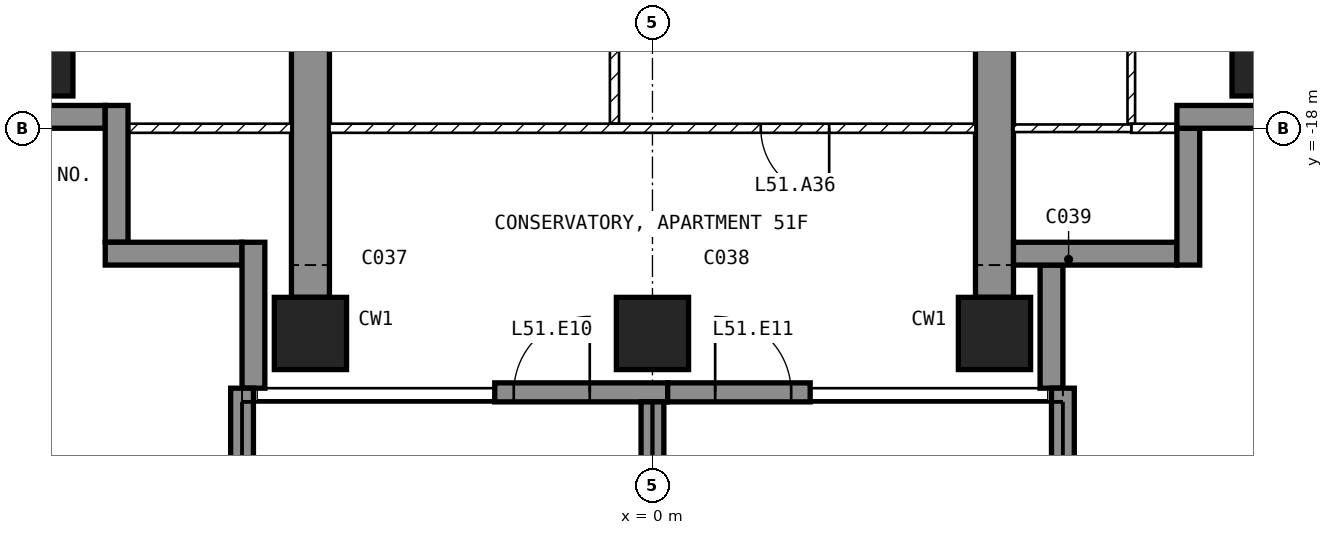
"""IFC4 building model, lengths in metres.
Left out: names, types, materials, properties, quantities, classifications, styles, units other than length and angle.
Written with IfcOpenShell. Run it as: python <this file> out.ifc"""

import sys

from ifc_helpers import new_model, si_unit, direction, frame, frame_2d, origin, origin_2d, place, context, subcontext, project, spatial, polyline, rectangle, outline, extrude, element, fill, save


model = new_model("IFC4")
c1 = context("Model", 3, precision=1e-05, world=origin(), true_north=direction((0.0, 1.0)))
c2 = subcontext(c1, "Body", "Model", "MODEL_VIEW")
j1 = project(units=[si_unit("LENGTHUNIT", "METRE"), si_unit("PLANEANGLEUNIT", "RADIAN")], contexts=[c1])
p1 = place(None, origin())
s1 = spatial("IfcSite", under=j1, at=p1, CompositionType="ELEMENT")
p2 = place(p1, origin())
s2 = spatial("IfcBuilding", under=s1, at=p2, CompositionType="ELEMENT")
p3 = place(p2, frame((0.0, 0.0, 205.1)))
s3 = spatial("IfcBuildingStorey", under=s2, at=p3, CompositionType="ELEMENT", Elevation=205.1)
for number, where, z_axis, x_axis in (
    (1, (-8.1, -17.1, -0.25), (0.0, 0.0, 1.0), (1.0, 0.0, 0.0)),
    (2, (-4.5, -20.7, -0.25), (0.0, 0.0, 1.0), (1.0, 0.0, 0.0)),
    (3, (0.0, -20.7, -0.25), (0.0, 0.0, 1.0), (1.0, 0.0, 0.0)),
    (4, (4.5, -20.7, -0.25), (0.0, 0.0, 1.0), (1.0, 0.0, 0.0)),
    (5, (8.1, -17.1, -0.25), (0.0, 0.0, 1.0), (1.0, 0.0, 0.0)),
):
    element("IfcColumn", number, at=place(p3, frame(where, z_axis=z_axis, x_axis=x_axis)), inside=s3, PredefinedType="COLUMN", context=c2, shape_type="SweptSolid", body=[
        extrude(rectangle(XDim=0.95, YDim=0.95, at=origin_2d()), origin(), (0.0, 0.0, 1.0), 3.5),
    ])
for number, where, z_axis, x_axis in (
    (6, (-4.75, -20.225, -0.25), (1.0, 0.0, 0.0), (0.0, 1.0, 0.0)),
    (7, (4.25, -20.225, -0.25), (1.0, 0.0, 0.0), (0.0, 1.0, 0.0)),
):
    element("IfcWall", number, at=place(p3, frame(where, z_axis=z_axis, x_axis=x_axis)), inside=s3, PredefinedType="SHEAR", context=c2, shape_type="SweptSolid", body=[
        extrude(outline(polyline([(0.0, 0.0), (6.725, 0.0), (6.725, 2.65), (9.125, 2.65), (9.125, 0.0), (11.225, 0.0), (11.225, 3.5), (0.0, 3.5), (0.0, 0.0)])), origin(), (0.0, 0.0, 1.0), 0.5),
    ])
p4 = place(p3, frame((-2.075, -21.475, 0.0), z_axis=(0.0, 0.0, 1.0), x_axis=(1.0, 0.0, 0.0)))
e8 = element("IfcWall", 8, at=p4, inside=s3, PredefinedType="SOLIDWALL", context=c2, shape_type="SweptSolid", body=[
    extrude(rectangle(XDim=2.275, YDim=0.25, at=frame_2d((1.137, 0.0))), origin(), (0.0, 0.0, 1.0), 3.25),
])
p5 = place(p4, frame((0.25, 0.0, 0.0)))
e9 = element("IfcOpeningElement", 9, at=p5, cuts=e8, PredefinedType="OPENING", context=c2, shape_type="SweptSolid", body=[
    extrude(rectangle(XDim=1.0, YDim=2.4, at=frame_2d((0.5, 1.2))), frame((0.0, 0.135, 0.0), z_axis=(0.0, -1.0, 0.0), x_axis=(1.0, 0.0, 0.0)), (0.0, 0.0, 1.0), 0.27),
])
p6 = place(p3, frame((0.2, -21.475, 0.0), z_axis=(0.0, 0.0, 1.0), x_axis=(1.0, 0.0, 0.0)))
e10 = element("IfcWall", 10, at=p6, inside=s3, PredefinedType="SOLIDWALL", context=c2, shape_type="SweptSolid", body=[
    extrude(rectangle(XDim=1.875, YDim=0.25, at=frame_2d((0.938, 0.0))), origin(), (0.0, 0.0, 1.0), 3.25),
])
p7 = place(p6, frame((0.625, 0.0, 0.0)))
e11 = element("IfcOpeningElement", 11, at=p7, cuts=e10, PredefinedType="OPENING", context=c2, shape_type="SweptSolid", body=[
    extrude(rectangle(XDim=1.0, YDim=2.4, at=frame_2d((0.5, 1.2))), frame((0.0, 0.135, 0.0), z_axis=(0.0, -1.0, 0.0), x_axis=(1.0, 0.0, 0.0)), (0.0, 0.0, 1.0), 0.27),
])
p8 = place(p3, frame((5.25, -21.42, 0.0), z_axis=(0.0, 0.0, 1.0), x_axis=(0.0, 1.0, 0.0)))
e12 = element("IfcWall", 12, at=p8, inside=s3, PredefinedType="SOLIDWALL", context=c2, shape_type="SweptSolid", body=[
    extrude(rectangle(XDim=1.62, YDim=0.3, at=frame_2d((0.81, 0.0))), origin(), (0.0, 0.0, 1.0), 3.25),
])
p9 = place(p3, frame((4.75, -19.65, 0.0), z_axis=(0.0, 0.0, 1.0), x_axis=(1.0, 0.0, 0.0)))
e13 = element("IfcWall", 13, at=p9, inside=s3, PredefinedType="SOLIDWALL", context=c2, shape_type="SweptSolid", body=[
    extrude(rectangle(XDim=2.15, YDim=0.3, at=frame_2d((1.075, 0.0))), origin(), (0.0, 0.0, 1.0), 3.25),
])
p10 = place(p3, frame((7.05, -19.8, 0.0), z_axis=(0.0, 0.0, 1.0), x_axis=(0.0, 1.0, 0.0)))
e14 = element("IfcWall", 14, at=p10, inside=s3, PredefinedType="SOLIDWALL", context=c2, shape_type="SweptSolid", body=[
    extrude(rectangle(XDim=1.8, YDim=0.3, at=frame_2d((0.9, 0.0))), origin(), (0.0, 0.0, 1.0), 3.25),
])
p11 = place(p3, frame((6.9, -17.85, 0.0), z_axis=(0.0, 0.0, 1.0), x_axis=(1.0, 0.0, 0.0)))
e15 = element("IfcWall", 15, at=p11, inside=s3, PredefinedType="SOLIDWALL", context=c2, shape_type="SweptSolid", body=[
    extrude(rectangle(XDim=1.85, YDim=0.3, at=frame_2d((0.925, 0.0))), origin(), (0.0, 0.0, 1.0), 3.25),
])
p12 = place(p3, frame((-8.75, -17.85, 0.0), z_axis=(0.0, 0.0, 1.0), x_axis=(1.0, 0.0, 0.0)))
e16 = element("IfcWall", 16, at=p12, inside=s3, PredefinedType="SOLIDWALL", context=c2, shape_type="SweptSolid", body=[
    extrude(rectangle(XDim=1.55, YDim=0.3, at=frame_2d((0.775, 0.0))), origin(), (0.0, 0.0, 1.0), 3.25),
])
for number, where, z_axis, x_axis in (
    (17, (-7.05, -17.7, 0.0), (0.0, 0.0, 1.0), (0.0, -1.0, 0.0)),
    (18, (-7.2, -19.65, 0.0), (0.0, 0.0, 1.0), (1.0, 0.0, 0.0)),
):
    element("IfcWall", number, at=place(p3, frame(where, z_axis=z_axis, x_axis=x_axis)), inside=s3, PredefinedType="SOLIDWALL", context=c2, shape_type="SweptSolid", body=[
        extrude(rectangle(XDim=1.8, YDim=0.3, at=frame_2d((0.9, 0.0))), origin(), (0.0, 0.0, 1.0), 3.25),
    ])
p13 = place(p3, frame((-5.25, -19.5, 0.0), z_axis=(0.0, 0.0, 1.0), x_axis=(0.0, -1.0, 0.0)))
e19 = element("IfcWall", 19, at=p13, inside=s3, PredefinedType="SOLIDWALL", context=c2, shape_type="SweptSolid", body=[
    extrude(rectangle(XDim=1.92, YDim=0.3, at=frame_2d((0.96, 0.0))), origin(), (0.0, 0.0, 1.0), 3.25),
])
p14 = place(p3, frame((-5.4, -21.42, 0.0), z_axis=(0.0, 0.0, 1.0), x_axis=(0.0, -1.0, 0.0)))
e20 = element("IfcWall", 20, at=p14, inside=s3, PredefinedType="SOLIDWALL", context=c2, shape_type="SweptSolid", body=[
    extrude(rectangle(XDim=2.88, YDim=0.3, at=frame_2d((1.44, 0.0))), origin(), (0.0, 0.0, 1.0), 3.25),
])
p15 = place(p3, frame((0.0, -21.6, 0.0), z_axis=(0.0, 0.0, 1.0), x_axis=(0.0, -1.0, 0.0)))
e21 = element("IfcWall", 21, at=p15, inside=s3, PredefinedType="SOLIDWALL", context=c2, shape_type="SweptSolid", body=[
    extrude(rectangle(XDim=2.7, YDim=0.3, at=frame_2d((1.35, 0.0))), origin(), (0.0, 0.0, 1.0), 3.25),
])
p16 = place(p3, frame((5.4, -21.42, 0.0), z_axis=(0.0, 0.0, 1.0), x_axis=(0.0, -1.0, 0.0)))
e22 = element("IfcWall", 22, at=p16, inside=s3, PredefinedType="SOLIDWALL", context=c2, shape_type="SweptSolid", body=[
    extrude(rectangle(XDim=2.88, YDim=0.3, at=frame_2d((1.44, 0.0))), origin(), (0.0, 0.0, 1.0), 3.25),
])
p17 = place(p3, frame((-0.5, -17.94, 0.0), z_axis=(0.0, 0.0, 1.0), x_axis=(0.0, 1.0, 0.0)))
e23 = element("IfcWall", 23, at=p17, inside=s3, PredefinedType="PARTITIONING", context=c2, shape_type="SweptSolid", body=[
    extrude(rectangle(XDim=2.88, YDim=0.12, at=frame_2d((1.44, 0.0))), origin(), (0.0, 0.0, 1.0), 3.25),
])
p18 = place(p17, frame((0.99, 0.0, 0.0)))
e24 = element("IfcOpeningElement", 24, at=p18, cuts=e23, PredefinedType="OPENING", context=c2, shape_type="SweptSolid", body=[
    extrude(rectangle(XDim=0.9, YDim=2.1, at=frame_2d((0.45, 1.05))), frame((0.0, 0.07, 0.0), z_axis=(0.0, -1.0, 0.0), x_axis=(1.0, 0.0, 0.0)), (0.0, 0.0, 1.0), 0.14),
])
p19 = place(p3, frame((4.25, -18.0, 0.0), z_axis=(0.0, 0.0, 1.0), x_axis=(-1.0, 0.0, 0.0)))
e25 = element("IfcWall", 25, at=p19, inside=s3, PredefinedType="PARTITIONING", context=c2, shape_type="SweptSolid", body=[
    extrude(rectangle(XDim=8.5, YDim=0.12, at=frame_2d((4.25, 0.0))), origin(), (0.0, 0.0, 1.0), 3.25),
])
p20 = place(p19, frame((1.925, 0.0, 0.0)))
e26 = element("IfcOpeningElement", 26, at=p20, cuts=e25, PredefinedType="OPENING", context=c2, shape_type="SweptSolid", body=[
    extrude(rectangle(XDim=0.9, YDim=2.1, at=frame_2d((0.45, 1.05))), frame((0.0, 0.07, 0.0), z_axis=(0.0, -1.0, 0.0), x_axis=(1.0, 0.0, 0.0)), (0.0, 0.0, 1.0), 0.14),
])
p21 = place(p3, frame((6.3, -17.94, 0.0), z_axis=(0.0, 0.0, 1.0), x_axis=(0.0, 1.0, 0.0)))
e27 = element("IfcWall", 27, at=p21, inside=s3, PredefinedType="PARTITIONING", context=c2, shape_type="SweptSolid", body=[
    extrude(rectangle(XDim=3.49, YDim=0.1, at=frame_2d((1.745, 0.0))), origin(), (0.0, 0.0, 1.0), 3.25),
])
p22 = place(p21, frame((1.32, 0.0, 0.0)))
e28 = element("IfcOpeningElement", 28, at=p22, cuts=e27, PredefinedType="OPENING", context=c2, shape_type="SweptSolid", body=[
    extrude(rectangle(XDim=0.85, YDim=2.1, at=frame_2d((0.425, 1.05))), frame((0.0, 0.06, 0.0), z_axis=(0.0, -1.0, 0.0), x_axis=(1.0, 0.0, 0.0)), (0.0, 0.0, 1.0), 0.12),
])
p23 = place(p3, frame((7.12, -18.0, 0.0), z_axis=(0.0, 0.0, 1.0), x_axis=(-1.0, 0.0, 0.0)))
e29 = element("IfcWall", 29, at=p23, inside=s3, PredefinedType="PARTITIONING", context=c2, shape_type="SweptSolid", body=[
    extrude(rectangle(XDim=0.82, YDim=0.12, at=frame_2d((0.41, 0.0))), origin(), (0.0, 0.0, 1.0), 3.25),
])
p24 = place(p3, frame((6.3, -18.0, 0.0), z_axis=(0.0, 0.0, 1.0), x_axis=(-1.0, 0.0, 0.0)))
e30 = element("IfcWall", 30, at=p24, inside=s3, PredefinedType="PARTITIONING", context=c2, shape_type="SweptSolid", body=[
    extrude(rectangle(XDim=1.55, YDim=0.1, at=frame_2d((0.775, 0.0))), origin(), (0.0, 0.0, 1.0), 3.25),
])
p25 = place(p3, frame((-4.75, -18.0, 0.0), z_axis=(0.0, 0.0, 1.0), x_axis=(-1.0, 0.0, 0.0)))
e31 = element("IfcWall", 31, at=p25, inside=s3, PredefinedType="PARTITIONING", context=c2, shape_type="SweptSolid", body=[
    extrude(rectangle(XDim=2.37, YDim=0.12, at=frame_2d((1.185, 0.0))), origin(), (0.0, 0.0, 1.0), 3.25),
])
p26 = place(p5, origin())
e32 = element("IfcDoor", 32, at=p26, inside=s3, OperationType="SINGLE_SWING_RIGHT", PredefinedType="DOOR", context=c2, shape_type="SweptSolid", body=[
    extrude(rectangle(XDim=1.0, YDim=2.4, at=frame_2d((0.5, 1.2))), frame((0.0, 0.025, 0.0), z_axis=(0.0, -1.0, 0.0), x_axis=(1.0, 0.0, 0.0)), (0.0, 0.0, 1.0), 0.05),
])
fill(e9, e32)
p27 = place(p7, origin())
e33 = element("IfcDoor", 33, at=p27, inside=s3, OperationType="SINGLE_SWING_LEFT", PredefinedType="DOOR", context=c2, shape_type="SweptSolid", body=[
    extrude(rectangle(XDim=1.0, YDim=2.4, at=frame_2d((0.5, 1.2))), frame((0.0, 0.025, 0.0), z_axis=(0.0, -1.0, 0.0), x_axis=(1.0, 0.0, 0.0)), (0.0, 0.0, 1.0), 0.05),
])
fill(e11, e33)
p28 = place(p20, origin())
e34 = element("IfcDoor", 34, at=p28, inside=s3, OperationType="SINGLE_SWING_LEFT", PredefinedType="DOOR", context=c2, shape_type="SweptSolid", body=[
    extrude(rectangle(XDim=0.9, YDim=2.1, at=frame_2d((0.45, 1.05))), frame((0.0, 0.025, 0.0), z_axis=(0.0, -1.0, 0.0), x_axis=(1.0, 0.0, 0.0)), (0.0, 0.0, 1.0), 0.05),
])
fill(e26, e34)
save(model, sys.argv[1])
